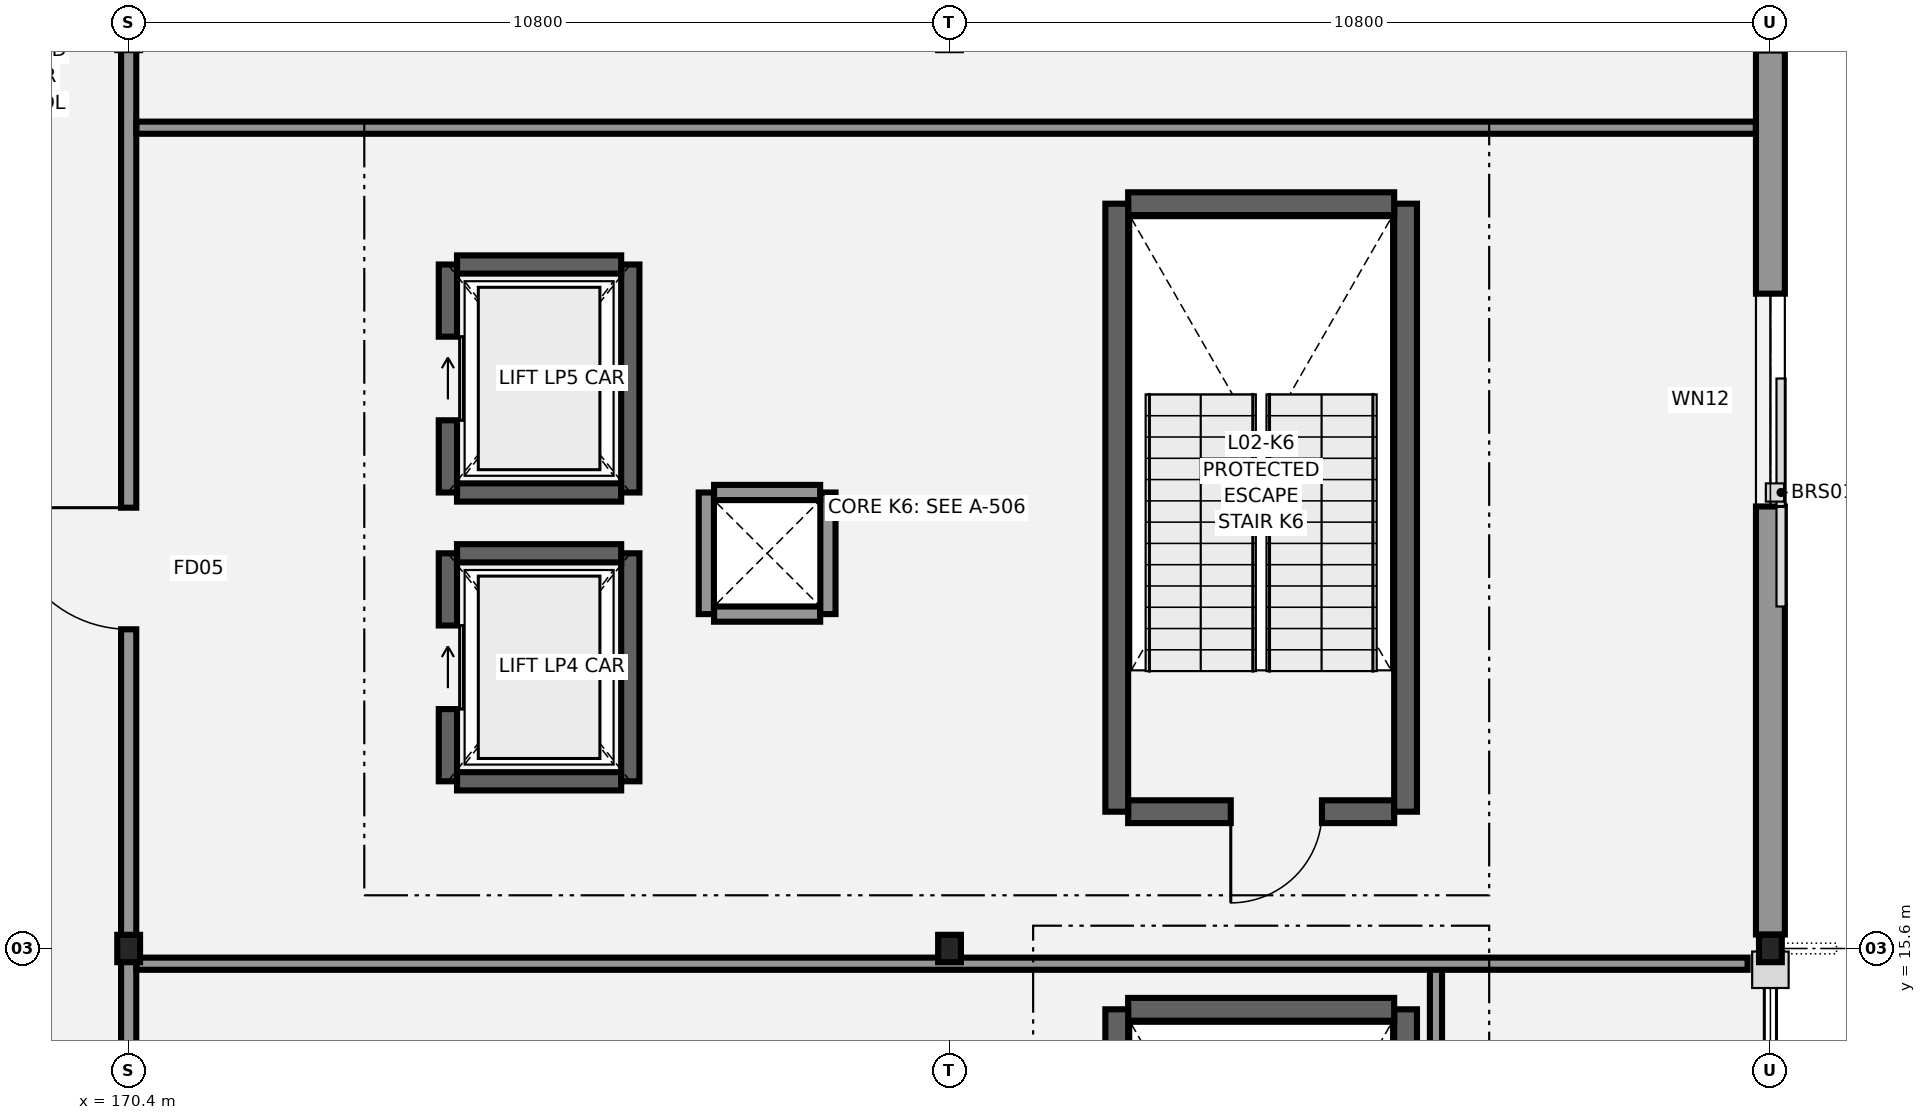
"""IFC4 building model, lengths in metres.
Left out: names, types, materials, properties, quantities, classifications, styles, units other than length and angle.
Written with IfcOpenShell. Run it as: python <this file> out.ifc"""

import sys

from ifc_helpers import new_model, si_unit, direction, frame, frame_2d, origin, origin_2d, place, context, subcontext, project, spatial, rectangle, i_section, extrude, element, fill, save


model = new_model("IFC4")
c1 = context("Model", 3, precision=1e-05, world=origin(), true_north=direction((0.0, 1.0)))
c2 = subcontext(c1, "Body", "Model", "MODEL_VIEW")
j1 = project(units=[si_unit("LENGTHUNIT", "METRE"), si_unit("PLANEANGLEUNIT", "RADIAN")], contexts=[c1])
p1 = place(None, origin())
s1 = spatial("IfcSite", under=j1, at=p1, CompositionType="ELEMENT")
p2 = place(p1, origin())
s2 = spatial("IfcBuilding", under=s1, at=p2, CompositionType="ELEMENT")
p3 = place(p2, frame((0.0, 0.0, 10.2)))
s3 = spatial("IfcBuildingStorey", under=s2, at=p3, CompositionType="ELEMENT", Elevation=10.2)
for number, where, z_axis, x_axis in (
    (1, (170.4, 15.6, 0.0), (0.0, 0.0, 1.0), (1.0, 0.0, 0.0)),
    (2, (181.2, 15.6, 0.0), (0.0, 0.0, 1.0), (1.0, 0.0, 0.0)),
    (3, (192.0, 15.6, 0.0), (0.0, 0.0, 1.0), (1.0, 0.0, 0.0)),
):
    element("IfcColumn", number, at=place(p3, frame(where, z_axis=z_axis, x_axis=x_axis)), inside=s3, PredefinedType="COLUMN", context=c2, shape_type="SweptSolid", body=[
        extrude(i_section(OverallWidth=0.3, OverallDepth=0.36, WebThickness=0.012, FlangeThickness=0.022, FilletRadius=0.027, at=origin_2d()), origin(), (0.0, 0.0, 1.0), 4.2),
    ])
p4 = place(p3, frame((187.2, 6.8, 0.0), z_axis=(0.0, 0.0, 1.0), x_axis=(0.0, 1.0, 0.0)))
e4 = element("IfcWall", 4, at=p4, inside=s3, PredefinedType="SHEAR", context=c2, shape_type="SweptSolid", body=[
    extrude(rectangle(XDim=8.0, YDim=0.3, at=frame_2d((4.0, 0.0))), origin(), (0.0, 0.0, 1.0), 3.89),
])
p5 = place(p3, frame((187.05, 14.8, 0.0), z_axis=(0.0, 0.0, 1.0), x_axis=(-1.0, 0.0, 0.0)))
e5 = element("IfcWall", 5, at=p5, inside=s3, PredefinedType="SHEAR", context=c2, shape_type="SweptSolid", body=[
    extrude(rectangle(XDim=3.5, YDim=0.3, at=frame_2d((1.75, 0.0))), origin(), (0.0, 0.0, 1.0), 3.89),
])
p6 = place(p3, frame((183.4, 14.8, 0.0), z_axis=(0.0, 0.0, 1.0), x_axis=(0.0, -1.0, 0.0)))
e6 = element("IfcWall", 6, at=p6, inside=s3, PredefinedType="SHEAR", context=c2, shape_type="SweptSolid", body=[
    extrude(rectangle(XDim=8.0, YDim=0.3, at=frame_2d((4.0, 0.0))), origin(), (0.0, 0.0, 1.0), 3.89),
])
p7 = place(p3, frame((187.05, 17.4, 0.0), z_axis=(0.0, 0.0, 1.0), x_axis=(-1.0, 0.0, 0.0)))
e7 = element("IfcWall", 7, at=p7, inside=s3, PredefinedType="SHEAR", context=c2, shape_type="SweptSolid", body=[
    extrude(rectangle(XDim=3.5, YDim=0.3, at=frame_2d((1.75, 0.0))), origin(), (0.0, 0.0, 1.0), 3.89),
])
p8 = place(p7, frame((0.95, 0.0, 0.0)))
e8 = element("IfcOpeningElement", 8, at=p8, cuts=e7, PredefinedType="OPENING", context=c2, shape_type="SweptSolid", body=[
    extrude(rectangle(XDim=1.2, YDim=2.2, at=frame_2d((0.6, 1.1))), frame((0.0, 0.16, 0.0), z_axis=(0.0, -1.0, 0.0), x_axis=(1.0, 0.0, 0.0)), (0.0, 0.0, 1.0), 0.32),
])
p9 = place(p3, frame((187.2, 17.4, 0.0), z_axis=(0.0, 0.0, 1.0), x_axis=(0.0, 1.0, 0.0)))
e9 = element("IfcWall", 9, at=p9, inside=s3, PredefinedType="SHEAR", context=c2, shape_type="SweptSolid", body=[
    extrude(rectangle(XDim=8.0, YDim=0.3, at=frame_2d((4.0, 0.0))), origin(), (0.0, 0.0, 1.0), 3.89),
])
p10 = place(p3, frame((187.05, 25.4, 0.0), z_axis=(0.0, 0.0, 1.0), x_axis=(-1.0, 0.0, 0.0)))
e10 = element("IfcWall", 10, at=p10, inside=s3, PredefinedType="SHEAR", context=c2, shape_type="SweptSolid", body=[
    extrude(rectangle(XDim=3.5, YDim=0.3, at=frame_2d((1.75, 0.0))), origin(), (0.0, 0.0, 1.0), 3.89),
])
p11 = place(p3, frame((183.4, 25.4, 0.0), z_axis=(0.0, 0.0, 1.0), x_axis=(0.0, -1.0, 0.0)))
e11 = element("IfcWall", 11, at=p11, inside=s3, PredefinedType="SHEAR", context=c2, shape_type="SweptSolid", body=[
    extrude(rectangle(XDim=8.0, YDim=0.3, at=frame_2d((4.0, 0.0))), origin(), (0.0, 0.0, 1.0), 3.89),
])
p12 = place(p3, frame((174.72, 17.8, 0.0), z_axis=(0.0, 0.0, 1.0), x_axis=(1.0, 0.0, 0.0)))
e12 = element("IfcWall", 12, at=p12, inside=s3, PredefinedType="SHEAR", context=c2, shape_type="SweptSolid", body=[
    extrude(rectangle(XDim=2.16, YDim=0.24, at=frame_2d((1.08, 0.0))), origin(), (0.0, 0.0, 1.0), 3.89),
])
p13 = place(p3, frame((177.0, 17.8, 0.0), z_axis=(0.0, 0.0, 1.0), x_axis=(0.0, 1.0, 0.0)))
e13 = element("IfcWall", 13, at=p13, inside=s3, PredefinedType="SHEAR", context=c2, shape_type="SweptSolid", body=[
    extrude(rectangle(XDim=3.0, YDim=0.24, at=frame_2d((1.5, 0.0))), origin(), (0.0, 0.0, 1.0), 3.89),
])
p14 = place(p3, frame((176.88, 20.8, 0.0), z_axis=(0.0, 0.0, 1.0), x_axis=(-1.0, 0.0, 0.0)))
e14 = element("IfcWall", 14, at=p14, inside=s3, PredefinedType="SHEAR", context=c2, shape_type="SweptSolid", body=[
    extrude(rectangle(XDim=2.16, YDim=0.24, at=frame_2d((1.08, 0.0))), origin(), (0.0, 0.0, 1.0), 3.89),
])
p15 = place(p3, frame((174.6, 20.8, 0.0), z_axis=(0.0, 0.0, 1.0), x_axis=(0.0, -1.0, 0.0)))
e15 = element("IfcWall", 15, at=p15, inside=s3, PredefinedType="SHEAR", context=c2, shape_type="SweptSolid", body=[
    extrude(rectangle(XDim=3.0, YDim=0.24, at=frame_2d((1.5, 0.0))), origin(), (0.0, 0.0, 1.0), 3.89),
])
p16 = place(p15, frame((0.95, 0.0, 0.0)))
e16 = element("IfcOpeningElement", 16, at=p16, cuts=e15, PredefinedType="OPENING", context=c2, shape_type="SweptSolid", body=[
    extrude(rectangle(XDim=1.1, YDim=2.1, at=frame_2d((0.55, 1.05))), frame((0.0, 0.13, 0.0), z_axis=(0.0, -1.0, 0.0), x_axis=(1.0, 0.0, 0.0)), (0.0, 0.0, 1.0), 0.26),
])
p17 = place(p3, frame((174.72, 21.6, 0.0), z_axis=(0.0, 0.0, 1.0), x_axis=(1.0, 0.0, 0.0)))
e17 = element("IfcWall", 17, at=p17, inside=s3, PredefinedType="SHEAR", context=c2, shape_type="SweptSolid", body=[
    extrude(rectangle(XDim=2.16, YDim=0.24, at=frame_2d((1.08, 0.0))), origin(), (0.0, 0.0, 1.0), 3.89),
])
p18 = place(p3, frame((177.0, 21.6, 0.0), z_axis=(0.0, 0.0, 1.0), x_axis=(0.0, 1.0, 0.0)))
e18 = element("IfcWall", 18, at=p18, inside=s3, PredefinedType="SHEAR", context=c2, shape_type="SweptSolid", body=[
    extrude(rectangle(XDim=3.0, YDim=0.24, at=frame_2d((1.5, 0.0))), origin(), (0.0, 0.0, 1.0), 3.89),
])
p19 = place(p3, frame((176.88, 24.6, 0.0), z_axis=(0.0, 0.0, 1.0), x_axis=(-1.0, 0.0, 0.0)))
e19 = element("IfcWall", 19, at=p19, inside=s3, PredefinedType="SHEAR", context=c2, shape_type="SweptSolid", body=[
    extrude(rectangle(XDim=2.16, YDim=0.24, at=frame_2d((1.08, 0.0))), origin(), (0.0, 0.0, 1.0), 3.89),
])
p20 = place(p3, frame((174.6, 24.6, 0.0), z_axis=(0.0, 0.0, 1.0), x_axis=(0.0, -1.0, 0.0)))
e20 = element("IfcWall", 20, at=p20, inside=s3, PredefinedType="SHEAR", context=c2, shape_type="SweptSolid", body=[
    extrude(rectangle(XDim=3.0, YDim=0.24, at=frame_2d((1.5, 0.0))), origin(), (0.0, 0.0, 1.0), 3.89),
])
p21 = place(p20, frame((0.95, 0.0, 0.0)))
e21 = element("IfcOpeningElement", 21, at=p21, cuts=e20, PredefinedType="OPENING", context=c2, shape_type="SweptSolid", body=[
    extrude(rectangle(XDim=1.1, YDim=2.1, at=frame_2d((0.55, 1.05))), frame((0.0, 0.13, 0.0), z_axis=(0.0, -1.0, 0.0), x_axis=(1.0, 0.0, 0.0)), (0.0, 0.0, 1.0), 0.26),
])
p22 = place(p3, frame((192.0, 27.416, 0.0), z_axis=(0.0, 0.0, 1.0), x_axis=(0.0, -1.0, 0.0)))
e22 = element("IfcWall", 22, at=p22, inside=s3, PredefinedType="STANDARD", context=c2, shape_type="SweptSolid", body=[
    extrude(rectangle(XDim=11.632, YDim=0.38, at=frame_2d((5.816, 0.0))), origin(), (0.0, 0.0, 1.0), 3.595),
])
p23 = place(p22, frame((3.2, 0.0, 0.8)))
e23 = element("IfcOpeningElement", 23, at=p23, cuts=e22, PredefinedType="OPENING", context=c2, shape_type="SweptSolid", body=[
    extrude(rectangle(XDim=2.8, YDim=2.1, at=frame_2d((1.4, 1.05))), frame((0.0, 0.2, 0.0), z_axis=(0.0, -1.0, 0.0), x_axis=(1.0, 0.0, 0.0)), (0.0, 0.0, 1.0), 0.4),
])
p24 = place(p3, frame((170.4, 6.8, 0.0), z_axis=(0.0, 0.0, 1.0), x_axis=(0.0, 1.0, 0.0)))
e24 = element("IfcWall", 24, at=p24, inside=s3, PredefinedType="PARTITIONING", context=c2, shape_type="SweptSolid", body=[
    extrude(rectangle(XDim=32.5, YDim=0.2, at=frame_2d((16.25, 0.0))), origin(), (0.0, 0.0, 1.0), 3.58),
])
p25 = place(p24, frame((3.2, 0.0, 0.0)))
e25 = element("IfcOpeningElement", 25, at=p25, cuts=e24, PredefinedType="OPENING", context=c2, shape_type="SweptSolid", body=[
    extrude(rectangle(XDim=1.05, YDim=2.15, at=frame_2d((0.525, 1.075))), frame((0.0, 0.11, 0.0), z_axis=(0.0, -1.0, 0.0), x_axis=(1.0, 0.0, 0.0)), (0.0, 0.0, 1.0), 0.22),
])
p26 = place(p24, frame((13.0, 0.0, 0.0)))
e26 = element("IfcOpeningElement", 26, at=p26, cuts=e24, PredefinedType="OPENING", context=c2, shape_type="SweptSolid", body=[
    extrude(rectangle(XDim=1.6, YDim=2.2, at=frame_2d((0.8, 1.1))), frame((0.0, 0.11, 0.0), z_axis=(0.0, -1.0, 0.0), x_axis=(1.0, 0.0, 0.0)), (0.0, 0.0, 1.0), 0.22),
])
p27 = place(p24, frame((22.8, 0.0, 0.0)))
e27 = element("IfcOpeningElement", 27, at=p27, cuts=e24, PredefinedType="OPENING", context=c2, shape_type="SweptSolid", body=[
    extrude(rectangle(XDim=1.15, YDim=2.15, at=frame_2d((0.575, 1.075))), frame((0.0, 0.11, 0.0), z_axis=(0.0, -1.0, 0.0), x_axis=(1.0, 0.0, 0.0)), (0.0, 0.0, 1.0), 0.22),
])
p28 = place(p24, frame((28.533, 0.0, 0.0)))
e28 = element("IfcOpeningElement", 28, at=p28, cuts=e24, PredefinedType="OPENING", context=c2, shape_type="SweptSolid", body=[
    extrude(rectangle(XDim=1.02, YDim=2.12, at=frame_2d((0.51, 1.06))), frame((0.0, 0.11, 0.0), z_axis=(0.0, -1.0, 0.0), x_axis=(1.0, 0.0, 0.0)), (0.0, 0.0, 1.0), 0.22),
])
p29 = place(p3, frame((187.6, 4.482, 0.0), z_axis=(0.0, 0.0, 1.0), x_axis=(0.0, 1.0, 0.0)))
e29 = element("IfcWall", 29, at=p29, inside=s3, PredefinedType="PARTITIONING", context=c2, shape_type="SweptSolid", body=[
    extrude(rectangle(XDim=10.918, YDim=0.16, at=frame_2d((5.459, 0.0))), origin(), (0.0, 0.0, 1.0), 3.58),
])
p30 = place(p3, frame((170.502, 15.4, 0.0), z_axis=(0.0, 0.0, 1.0), x_axis=(1.0, 0.0, 0.0)))
e30 = element("IfcWall", 30, at=p30, inside=s3, PredefinedType="PARTITIONING", context=c2, shape_type="SweptSolid", body=[
    extrude(rectangle(XDim=21.198, YDim=0.16, at=frame_2d((10.599, 0.0))), origin(), (0.0, 0.0, 1.0), 3.445),
])
p31 = place(p3, frame((170.502, 26.4, 0.0), z_axis=(0.0, 0.0, 1.0), x_axis=(1.0, 0.0, 0.0)))
e31 = element("IfcWall", 31, at=p31, inside=s3, PredefinedType="PARTITIONING", context=c2, shape_type="SweptSolid", body=[
    extrude(rectangle(XDim=21.306, YDim=0.16, at=frame_2d((10.653, 0.0))), origin(), (0.0, 0.0, 1.0), 3.58),
])
p32 = place(p3, frame((178.102, 20.0, 0.0), z_axis=(0.0, 0.0, 1.0), x_axis=(1.0, 0.0, 0.0)))
e32 = element("IfcWall", 32, at=p32, inside=s3, PredefinedType="PARTITIONING", context=c2, shape_type="SweptSolid", body=[
    extrude(rectangle(XDim=1.396, YDim=0.2, at=frame_2d((0.698, 0.0))), origin(), (0.0, 0.0, 1.0), 3.58),
])
p33 = place(p3, frame((179.6, 20.0, 0.0), z_axis=(0.0, 0.0, 1.0), x_axis=(0.0, 1.0, 0.0)))
e33 = element("IfcWall", 33, at=p33, inside=s3, PredefinedType="PARTITIONING", context=c2, shape_type="SweptSolid", body=[
    extrude(rectangle(XDim=1.6, YDim=0.2, at=frame_2d((0.8, 0.0))), origin(), (0.0, 0.0, 1.0), 3.58),
])
p34 = place(p3, frame((179.498, 21.6, 0.0), z_axis=(0.0, 0.0, 1.0), x_axis=(-1.0, 0.0, 0.0)))
e34 = element("IfcWall", 34, at=p34, inside=s3, PredefinedType="PARTITIONING", context=c2, shape_type="SweptSolid", body=[
    extrude(rectangle(XDim=1.396, YDim=0.2, at=frame_2d((0.698, 0.0))), origin(), (0.0, 0.0, 1.0), 3.58),
])
p35 = place(p3, frame((178.0, 21.6, 0.0), z_axis=(0.0, 0.0, 1.0), x_axis=(0.0, -1.0, 0.0)))
e35 = element("IfcWall", 35, at=p35, inside=s3, PredefinedType="PARTITIONING", context=c2, shape_type="SweptSolid", body=[
    extrude(rectangle(XDim=1.6, YDim=0.2, at=frame_2d((0.8, 0.0))), origin(), (0.0, 0.0, 1.0), 3.58),
])
p36 = place(p23, origin())
e36 = element("IfcWindow", 36, at=p36, inside=s3, PartitioningType="SINGLE_PANEL", PredefinedType="WINDOW", context=c2, shape_type="SweptSolid", body=[
    extrude(rectangle(XDim=2.8, YDim=2.1, at=frame_2d((1.4, 1.05))), frame((0.0, 0.03, 0.0), z_axis=(0.0, -1.0, 0.0), x_axis=(1.0, 0.0, 0.0)), (0.0, 0.0, 1.0), 0.06),
])
fill(e23, e36)
p37 = place(p26, origin())
e37 = element("IfcDoor", 37, at=p37, inside=s3, OperationType="SINGLE_SWING_RIGHT", PredefinedType="DOOR", context=c2, shape_type="SweptSolid", body=[
    extrude(rectangle(XDim=1.6, YDim=2.2, at=frame_2d((0.8, 1.1))), frame((0.0, 0.025, 0.0), z_axis=(0.0, -1.0, 0.0), x_axis=(1.0, 0.0, 0.0)), (0.0, 0.0, 1.0), 0.05),
])
fill(e26, e37)
p38 = place(p8, origin())
e38 = element("IfcDoor", 38, at=p38, inside=s3, OperationType="SINGLE_SWING_RIGHT", PredefinedType="DOOR", context=c2, shape_type="SweptSolid", body=[
    extrude(rectangle(XDim=1.2, YDim=2.2, at=frame_2d((0.6, 1.1))), frame((0.0, 0.025, 0.0), z_axis=(0.0, -1.0, 0.0), x_axis=(1.0, 0.0, 0.0)), (0.0, 0.0, 1.0), 0.05),
])
fill(e8, e38)
p39 = place(p16, origin())
e39 = element("IfcDoor", 39, at=p39, inside=s3, OperationType="SLIDING_TO_LEFT", PredefinedType="DOOR", context=c2, shape_type="SweptSolid", body=[
    extrude(rectangle(XDim=1.1, YDim=2.1, at=frame_2d((0.55, 1.05))), frame((0.0, 0.025, 0.0), z_axis=(0.0, -1.0, 0.0), x_axis=(1.0, 0.0, 0.0)), (0.0, 0.0, 1.0), 0.05),
])
fill(e16, e39)
p40 = place(p21, origin())
e40 = element("IfcDoor", 40, at=p40, inside=s3, OperationType="SLIDING_TO_LEFT", PredefinedType="DOOR", context=c2, shape_type="SweptSolid", body=[
    extrude(rectangle(XDim=1.1, YDim=2.1, at=frame_2d((0.55, 1.05))), frame((0.0, 0.025, 0.0), z_axis=(0.0, -1.0, 0.0), x_axis=(1.0, 0.0, 0.0)), (0.0, 0.0, 1.0), 0.05),
])
fill(e21, e40)
save(model, sys.argv[1])
